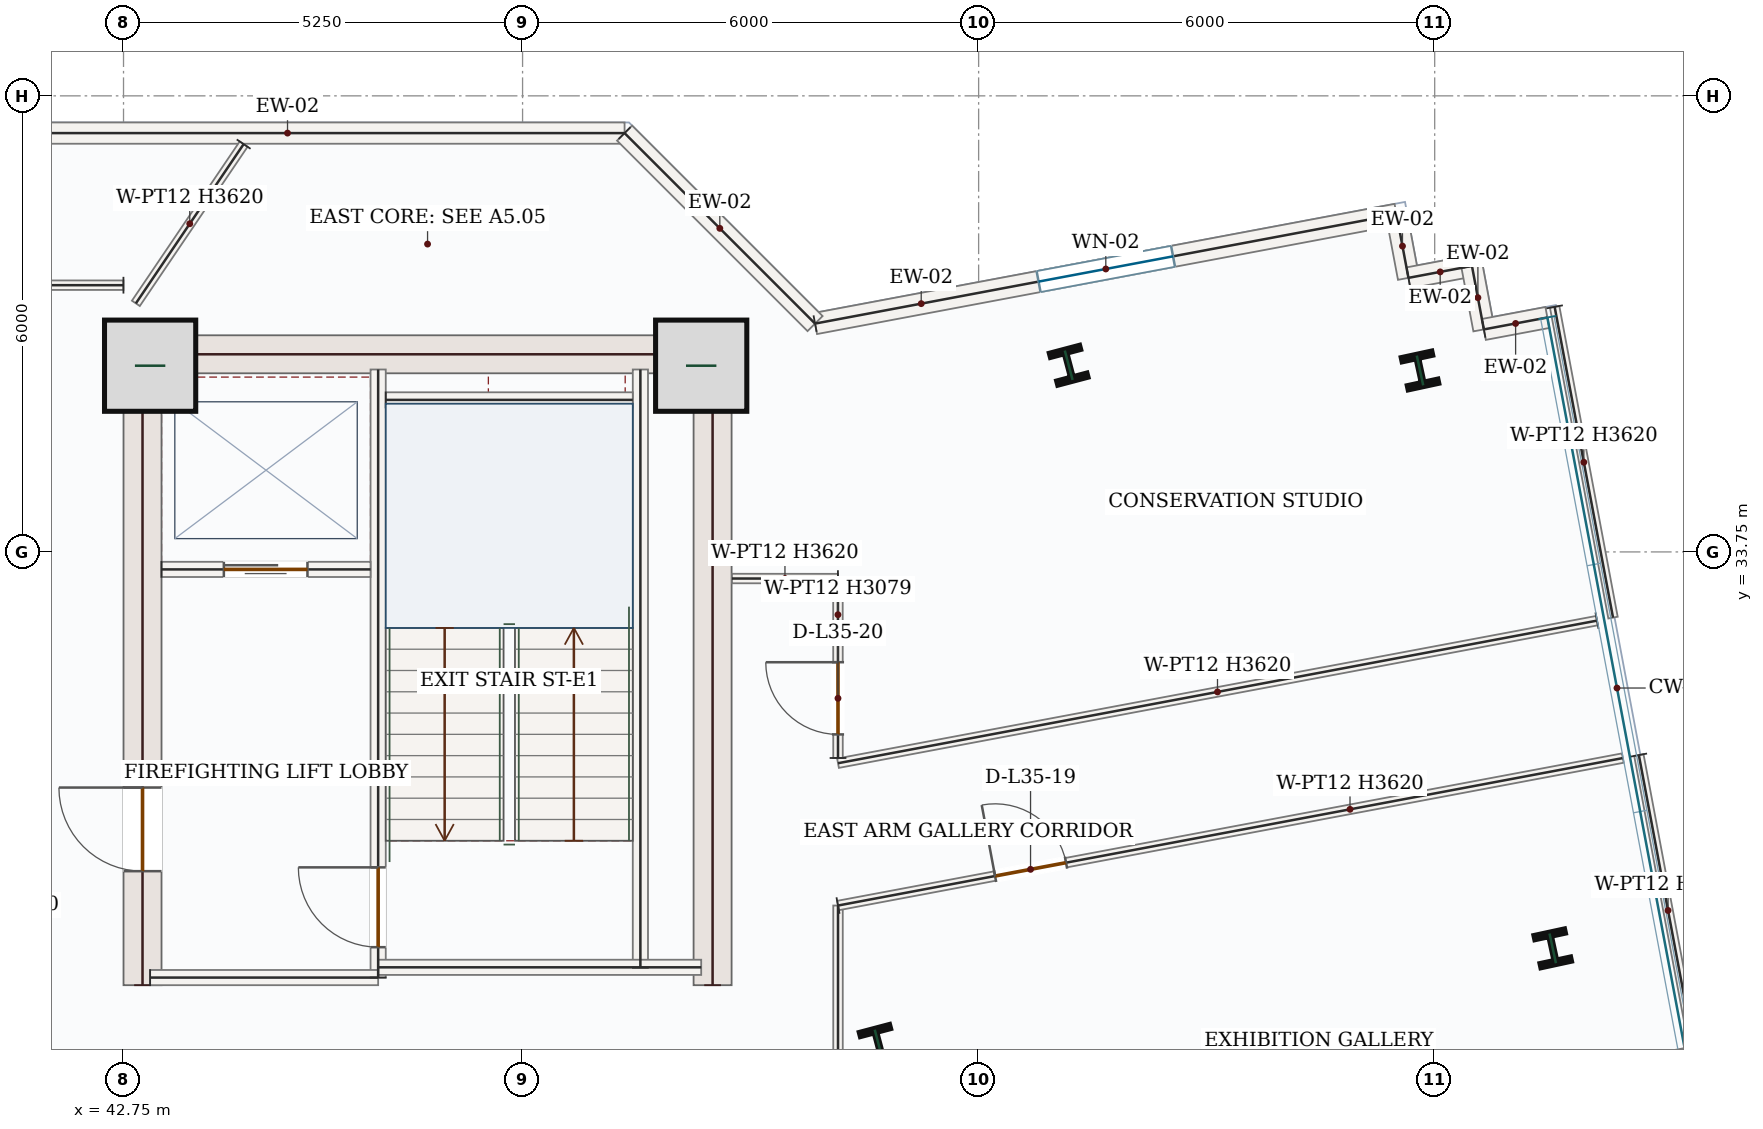
"""IFC4 building model, lengths in metres.
Left out: names, types, materials, properties, quantities, classifications, styles, units other than length and angle.
Written with IfcOpenShell. Run it as: python <this file> out.ifc"""

import sys

from ifc_helpers import new_model, si_unit, direction, frame, frame_2d, origin, origin_2d, place, context, subcontext, project, spatial, rectangle, i_section, extrude, source, transform, mapped, element, fill, save


model = new_model("IFC4")
c1 = context("Model", 3, precision=1e-05, world=origin(), true_north=direction((0.0, 1.0)))
c2 = subcontext(c1, "Body", "Model", "MODEL_VIEW")
j1 = project(units=[si_unit("LENGTHUNIT", "METRE"), si_unit("PLANEANGLEUNIT", "RADIAN")], contexts=[c1])
p1 = place(None, origin())
s1 = spatial("IfcSite", under=j1, at=p1, CompositionType="ELEMENT")
p2 = place(p1, origin())
s2 = spatial("IfcBuilding", under=s1, at=p2, CompositionType="ELEMENT")
p3 = place(p2, frame((0.0, 0.0, 155.1)))
s3 = spatial("IfcBuildingStorey", under=s2, at=p3, CompositionType="ELEMENT", Elevation=155.1)
p4 = place(p3, frame((43.0, 28.05, 0.0), z_axis=(0.0, 0.0, 1.0), x_axis=(0.0, 1.0, 0.0)))
e1 = element("IfcWall", 1, at=p4, inside=s3, PredefinedType="SHEAR", context=c2, shape_type="SweptSolid", body=[
    extrude(rectangle(XDim=8.55, YDim=0.5, at=frame_2d((4.275, 0.0))), origin(), (0.0, 0.0, 1.0), 3.62),
])
p5 = place(p4, frame((1.5, 0.0, 0.0)))
e2 = element("IfcOpeningElement", 2, at=p5, cuts=e1, PredefinedType="OPENING", context=c2, shape_type="SweptSolid", body=[
    extrude(rectangle(XDim=1.1, YDim=2.2, at=frame_2d((0.55, 1.1))), frame((0.0, 0.26, 0.0), z_axis=(0.0, -1.0, 0.0), x_axis=(1.0, 0.0, 0.0)), (0.0, 0.0, 1.0), 0.52),
])
m1 = source(origin(), c2, "Body", "SweptSolid", [
    extrude(rectangle(XDim=8.55, YDim=0.5, at=frame_2d((4.275, 0.0))), origin(), (0.0, 0.0, 1.0), 3.62),
])
p6 = place(p3, frame((50.5, 28.05, 0.0), z_axis=(0.0, 0.0, 1.0), x_axis=(0.0, 1.0, 0.0)))
e3 = element("IfcWall", 3, at=p6, inside=s3, PredefinedType="SHEAR", context=c2, shape_type="MappedRepresentation", body=[
    mapped(m1, transform((0.0, 0.0, 0.0), x_axis=(1.0, 0.0, 0.0), y_axis=(0.0, 1.0, 0.0), z_axis=(0.0, 0.0, 1.0), scale=1.0)),
])
m2 = source(origin(), c2, "Body", "SweptSolid", [
    extrude(rectangle(XDim=7.0, YDim=0.5, at=frame_2d((3.5, 0.0))), origin(), (0.0, 0.0, 1.0), 3.62),
])
p7 = place(p3, frame((43.25, 36.35, 0.0), z_axis=(0.0, 0.0, 1.0), x_axis=(1.0, 0.0, 0.0)))
e4 = element("IfcWall", 4, at=p7, inside=s3, PredefinedType="SHEAR", context=c2, shape_type="MappedRepresentation", body=[
    mapped(m2, transform((0.0, 0.0, 0.0), x_axis=(1.0, 0.0, 0.0), y_axis=(0.0, 1.0, 0.0), z_axis=(0.0, 0.0, 1.0), scale=1.0)),
])
m3 = source(origin(), c2, "Body", "SweptSolid", [
    extrude(rectangle(XDim=1.2, YDim=1.2, at=origin_2d()), origin(), (0.0, 0.0, 1.0), 3.9),
])
for number, where, z_axis, x_axis in (
    (5, (43.1, 36.2, 0.0), (0.0, 0.0, 1.0), (1.0, 0.0, 0.0)),
    (6, (50.35, 36.2, 0.0), (0.0, 0.0, 1.0), (1.0, 0.0, 0.0)),
):
    element("IfcColumn", number, at=place(p3, frame(where, z_axis=z_axis, x_axis=x_axis)), inside=s3, PredefinedType="COLUMN", context=c2, shape_type="MappedRepresentation", body=[
        mapped(m3, transform((0.0, 0.0, 0.0), x_axis=(1.0, 0.0, 0.0), y_axis=(0.0, 1.0, 0.0), z_axis=(0.0, 0.0, 1.0), scale=1.0)),
    ])
m4 = source(origin(), c2, "Body", "SweptSolid", [
    extrude(i_section(OverallWidth=0.412, OverallDepth=0.435, WebThickness=0.036, FlangeThickness=0.057, FilletRadius=0.018, at=origin_2d()), origin(), (0.0, 0.0, 1.0), 3.9),
])
for number, where, z_axis, x_axis in (
    (7, (52.684, 27.271, 0.0), (0.0, 0.0, 1.0), (0.967, 0.255, 0.0)),
    (8, (55.185, 36.206, 0.0), (0.0, 0.0, 1.0), (0.967, 0.255, 0.0)),
    (9, (61.553, 28.535, 0.0), (0.0, 0.0, 1.0), (0.977, 0.211, 0.0)),
    (10, (59.807, 36.137, 0.0), (0.0, 0.0, 1.0), (0.977, 0.211, 0.0)),
):
    element("IfcColumn", number, at=place(p3, frame(where, z_axis=z_axis, x_axis=x_axis)), inside=s3, PredefinedType="COLUMN", context=c2, shape_type="MappedRepresentation", body=[
        mapped(m4, transform((0.0, 0.0, 0.0), x_axis=(1.0, 0.0, 0.0), y_axis=(0.0, 1.0, 0.0), z_axis=(0.0, 0.0, 1.0), scale=1.0)),
    ])
p8 = place(p3, frame((51.848, 36.754, 0.0), z_axis=(0.0, 0.0, 1.0), x_axis=(0.982809278234, 0.18462373254, 0.0)))
e11 = element("IfcWall", 11, at=p8, inside=s3, PredefinedType="SOLIDWALL", context=c2, shape_type="SweptSolid", body=[
    extrude(rectangle(XDim=7.783, YDim=0.28, at=frame_2d((3.892, 0.0))), origin(), (0.0, 0.0, 1.0), 3.62),
])
p9 = place(p8, frame((2.992, 0.0, 0.85)))
e12 = element("IfcOpeningElement", 12, at=p9, cuts=e11, PredefinedType="OPENING", context=c2, shape_type="SweptSolid", body=[
    extrude(rectangle(XDim=1.8, YDim=1.75, at=frame_2d((0.9, 0.875))), frame((0.0, 0.15, 0.0), z_axis=(0.0, -1.0, 0.0), x_axis=(1.0, 0.0, 0.0)), (0.0, 0.0, 1.0), 0.3),
])
m5 = source(origin(), c2, "Body", "SweptSolid", [
    extrude(rectangle(XDim=0.85, YDim=0.28, at=frame_2d((0.425, 0.0))), origin(), (0.0, 0.0, 1.0), 3.62),
])
p10 = place(p3, frame((59.498, 38.191, 0.0), z_axis=(0.0, 0.0, 1.0), x_axis=(0.184670010318, -0.982800583684, 0.0)))
e13 = element("IfcWall", 13, at=p10, inside=s3, PredefinedType="SOLIDWALL", context=c2, shape_type="MappedRepresentation", body=[
    mapped(m5, transform((0.0, 0.0, 0.0), x_axis=(1.0, 0.0, 0.0), y_axis=(0.0, 1.0, 0.0), z_axis=(0.0, 0.0, 1.0), scale=1.0)),
])
m6 = source(origin(), c2, "Body", "SweptSolid", [
    extrude(rectangle(XDim=0.85, YDim=0.28, at=frame_2d((0.425, 0.0))), origin(), (0.0, 0.0, 1.0), 3.62),
])
for number, where, z_axis, x_axis in (
    (14, (59.655, 37.355, 0.0), (0.0, 0.0, 1.0), (0.983, 0.185, 0.0)),
    (15, (60.49, 37.512, 0.0), (0.0, 0.0, 1.0), (0.185, -0.983, 0.0)),
):
    element("IfcWall", number, at=place(p3, frame(where, z_axis=z_axis, x_axis=x_axis)), inside=s3, PredefinedType="SOLIDWALL", context=c2, shape_type="MappedRepresentation", body=[
        mapped(m6, transform((0.0, 0.0, 0.0), x_axis=(1.0, 0.0, 0.0), y_axis=(0.0, 1.0, 0.0), z_axis=(0.0, 0.0, 1.0), scale=1.0)),
    ])
for number, where, z_axis, x_axis in (
    (16, (60.647, 36.677, 0.0), (0.0, 0.0, 1.0), (0.983, 0.184, 0.0)),
    (17, (63.314, 27.085, 0.0), (0.0, 0.0, 1.0), (-0.983, -0.185, 0.0)),
):
    element("IfcWall", number, at=place(p3, frame(where, z_axis=z_axis, x_axis=x_axis)), inside=s3, PredefinedType="SOLIDWALL", context=c2, shape_type="MappedRepresentation", body=[
        mapped(m5, transform((0.0, 0.0, 0.0), x_axis=(1.0, 0.0, 0.0), y_axis=(0.0, 1.0, 0.0), z_axis=(0.0, 0.0, 1.0), scale=1.0)),
    ])
m7 = source(origin(), c2, "Body", "SweptSolid", [
    extrude(rectangle(XDim=8.869, YDim=0.28, at=frame_2d((4.434, 0.0))), origin(), (0.0, 0.0, 1.0), 3.62),
])
p11 = place(p3, frame((40.473, 39.26, 0.0), z_axis=(0.0, 0.0, 1.0), x_axis=(1.0, 0.0, 0.0)))
e18 = element("IfcWall", 18, at=p11, inside=s3, PredefinedType="SOLIDWALL", context=c2, shape_type="MappedRepresentation", body=[
    mapped(m7, transform((0.0, 0.0, 0.0), x_axis=(1.0, 0.0, 0.0), y_axis=(0.0, 1.0, 0.0), z_axis=(0.0, 0.0, 1.0), scale=1.0)),
])
m8 = source(origin(), c2, "Body", "SweptSolid", [
    extrude(rectangle(XDim=3.544, YDim=0.28, at=frame_2d((1.772, 0.0))), origin(), (0.0, 0.0, 1.0), 3.62),
])
p12 = place(p3, frame((49.342, 39.26, 0.0), z_axis=(0.0, 0.0, 1.0), x_axis=(0.707106781187, -0.707106781187, 0.0)))
e19 = element("IfcWall", 19, at=p12, inside=s3, PredefinedType="SOLIDWALL", context=c2, shape_type="MappedRepresentation", body=[
    mapped(m8, transform((0.0, 0.0, 0.0), x_axis=(1.0, 0.0, 0.0), y_axis=(0.0, 1.0, 0.0), z_axis=(0.0, 0.0, 1.0), scale=1.0)),
])
m9 = source(origin(), c2, "Body", "SweptSolid", [
    extrude(rectangle(XDim=7.87, YDim=0.2, at=frame_2d((3.935, 0.0))), origin(), (0.0, 0.0, 1.0), 3.62),
])
p13 = place(p3, frame((49.55, 28.28, 0.0), z_axis=(0.0, 0.0, 1.0), x_axis=(0.0, 1.0, 0.0)))
e20 = element("IfcWall", 20, at=p13, inside=s3, PredefinedType="SOLIDWALL", context=c2, shape_type="MappedRepresentation", body=[
    mapped(m9, transform((0.0, 0.0, 0.0), x_axis=(1.0, 0.0, 0.0), y_axis=(0.0, 1.0, 0.0), z_axis=(0.0, 0.0, 1.0), scale=1.0)),
])
p14 = place(p3, frame((46.1, 28.15, 0.0), z_axis=(0.0, 0.0, 1.0), x_axis=(0.0, 1.0, 0.0)))
e21 = element("IfcWall", 21, at=p14, inside=s3, PredefinedType="SOLIDWALL", context=c2, shape_type="SweptSolid", body=[
    extrude(rectangle(XDim=8.0, YDim=0.2, at=frame_2d((4.0, 0.0))), origin(), (0.0, 0.0, 1.0), 3.62),
])
p15 = place(p14, frame((0.4, 0.0, 0.0)))
e22 = element("IfcOpeningElement", 22, at=p15, cuts=e21, PredefinedType="OPENING", context=c2, shape_type="SweptSolid", body=[
    extrude(rectangle(XDim=1.05, YDim=2.15, at=frame_2d((0.525, 1.075))), frame((0.0, 0.11, 0.0), z_axis=(0.0, -1.0, 0.0), x_axis=(1.0, 0.0, 0.0)), (0.0, 0.0, 1.0), 0.22),
])
m10 = source(origin(), c2, "Body", "SweptSolid", [
    extrude(rectangle(XDim=3.0, YDim=0.2, at=frame_2d((1.5, 0.0))), origin(), (0.0, 0.0, 1.0), 3.62),
])
p16 = place(p3, frame((43.1, 28.15, 0.0), z_axis=(0.0, 0.0, 1.0), x_axis=(1.0, 0.0, 0.0)))
e23 = element("IfcWall", 23, at=p16, inside=s3, PredefinedType="SOLIDWALL", context=c2, shape_type="MappedRepresentation", body=[
    mapped(m10, transform((0.0, 0.0, 0.0), x_axis=(1.0, 0.0, 0.0), y_axis=(0.0, 1.0, 0.0), z_axis=(0.0, 0.0, 1.0), scale=1.0)),
])
m11 = source(origin(), c2, "Body", "SweptSolid", [
    extrude(rectangle(XDim=4.25, YDim=0.2, at=frame_2d((2.125, 0.0))), origin(), (0.0, 0.0, 1.0), 3.62),
])
p17 = place(p3, frame((46.1, 28.285, 0.0), z_axis=(0.0, 0.0, 1.0), x_axis=(1.0, 0.0, 0.0)))
e24 = element("IfcWall", 24, at=p17, inside=s3, PredefinedType="SOLIDWALL", context=c2, shape_type="MappedRepresentation", body=[
    mapped(m11, transform((0.0, 0.0, 0.0), x_axis=(1.0, 0.0, 0.0), y_axis=(0.0, 1.0, 0.0), z_axis=(0.0, 0.0, 1.0), scale=1.0)),
])
m12 = source(origin(), c2, "Body", "SweptSolid", [
    extrude(rectangle(XDim=3.25, YDim=0.2, at=frame_2d((1.625, 0.0))), origin(), (0.0, 0.0, 1.0), 3.62),
])
p18 = place(p3, frame((46.2, 35.75, 0.0), z_axis=(0.0, 0.0, 1.0), x_axis=(1.0, 0.0, 0.0)))
e25 = element("IfcWall", 25, at=p18, inside=s3, PredefinedType="SOLIDWALL", context=c2, shape_type="MappedRepresentation", body=[
    mapped(m12, transform((0.0, 0.0, 0.0), x_axis=(1.0, 0.0, 0.0), y_axis=(0.0, 1.0, 0.0), z_axis=(0.0, 0.0, 1.0), scale=1.0)),
])
p19 = place(p3, frame((43.25, 33.52, 0.0), z_axis=(0.0, 0.0, 1.0), x_axis=(1.0, 0.0, 0.0)))
e26 = element("IfcWall", 26, at=p19, inside=s3, PredefinedType="SOLIDWALL", context=c2, shape_type="SweptSolid", body=[
    extrude(rectangle(XDim=2.75, YDim=0.2, at=frame_2d((1.375, 0.0))), origin(), (0.0, 0.0, 1.0), 3.62),
])
p20 = place(p19, frame((0.82, 0.0, 0.0)))
e27 = element("IfcOpeningElement", 27, at=p20, cuts=e26, PredefinedType="OPENING", context=c2, shape_type="SweptSolid", body=[
    extrude(rectangle(XDim=1.1, YDim=2.15, at=frame_2d((0.55, 1.075))), frame((0.0, 0.11, 0.0), z_axis=(0.0, -1.0, 0.0), x_axis=(1.0, 0.0, 0.0)), (0.0, 0.0, 1.0), 0.22),
])
p21 = place(p3, frame((42.749, 37.259, 0.0), z_axis=(0.0, 0.0, 1.0), x_axis=(-0.999999992041, 0.000126163065, 0.0)))
e28 = element("IfcWall", 28, at=p21, inside=s3, PredefinedType="PARTITIONING", context=c2, shape_type="SweptSolid", body=[
    extrude(rectangle(XDim=7.74, YDim=0.125, at=frame_2d((3.87, 0.0))), origin(), (0.0, 0.0, 1.0), 3.62),
])
p22 = place(p21, frame((5.296, 0.0, 0.0)))
e29 = element("IfcOpeningElement", 29, at=p22, cuts=e28, PredefinedType="OPENING", context=c2, shape_type="SweptSolid", body=[
    extrude(rectangle(XDim=0.95, YDim=2.15, at=frame_2d((0.475, 1.075))), frame((0.0, 0.073, 0.0), z_axis=(0.0, -1.0, 0.0), x_axis=(1.0, 0.0, 0.0)), (0.0, 0.0, 1.0), 0.145),
])
m13 = source(origin(), c2, "Body", "SweptSolid", [
    extrude(rectangle(XDim=2.53, YDim=0.125, at=frame_2d((1.265, 0.0))), origin(), (0.0, 0.0, 1.0), 3.62),
])
p23 = place(p3, frame((44.33, 39.115, 0.0), z_axis=(0.0, 0.0, 1.0), x_axis=(-0.560455418396, -0.82818459536, 0.0)))
e30 = element("IfcWall", 30, at=p23, inside=s3, PredefinedType="PARTITIONING", context=c2, shape_type="MappedRepresentation", body=[
    mapped(m13, transform((0.0, 0.0, 0.0), x_axis=(1.0, 0.0, 0.0), y_axis=(0.0, 1.0, 0.0), z_axis=(0.0, 0.0, 1.0), scale=1.0)),
])
m14 = source(origin(), c2, "Body", "SweptSolid", [
    extrude(rectangle(XDim=4.16, YDim=0.125, at=frame_2d((2.08, 0.0))), origin(), (0.0, 0.0, 1.0), 3.62),
])
p24 = place(p3, frame((62.686, 31.077, 0.0), z_axis=(0.0, 0.0, 1.0), x_axis=(0.184635785614, -0.982807013951, 0.0)))
e31 = element("IfcWall", 31, at=p24, inside=s3, PredefinedType="PARTITIONING", context=c2, shape_type="MappedRepresentation", body=[
    mapped(m14, transform((0.0, 0.0, 0.0), x_axis=(1.0, 0.0, 0.0), y_axis=(0.0, 1.0, 0.0), z_axis=(0.0, 0.0, 1.0), scale=1.0)),
])
m15 = source(origin(), c2, "Body", "SweptSolid", [
    extrude(rectangle(XDim=5.975, YDim=0.125, at=frame_2d((2.988, 0.0))), origin(), (0.0, 0.0, 1.0), 2.693),
])
p25 = place(p3, frame((52.15, 23.123, 0.0), z_axis=(0.0, 0.0, 1.0), x_axis=(0.0, 1.0, 0.0)))
e32 = element("IfcWall", 32, at=p25, inside=s3, PredefinedType="PARTITIONING", context=c2, shape_type="MappedRepresentation", body=[
    mapped(m15, transform((0.0, 0.0, 0.0), x_axis=(1.0, 0.0, 0.0), y_axis=(0.0, 1.0, 0.0), z_axis=(0.0, 0.0, 1.0), scale=1.0)),
])
p26 = place(p3, frame((52.15, 29.098, 0.0), z_axis=(0.0, 0.0, 1.0), x_axis=(0.982805559331, 0.184643528314, 0.0)))
e33 = element("IfcWall", 33, at=p26, inside=s3, PredefinedType="PARTITIONING", context=c2, shape_type="SweptSolid", body=[
    extrude(rectangle(XDim=10.505, YDim=0.125, at=frame_2d((5.252, 0.0))), origin(), (0.0, 0.0, 1.0), 3.62),
])
p27 = place(p26, frame((2.102, 0.0, 0.0)))
e34 = element("IfcOpeningElement", 34, at=p27, cuts=e33, PredefinedType="OPENING", context=c2, shape_type="SweptSolid", body=[
    extrude(rectangle(XDim=0.95, YDim=2.15, at=frame_2d((0.475, 1.075))), frame((0.0, 0.073, 0.0), z_axis=(0.0, -1.0, 0.0), x_axis=(1.0, 0.0, 0.0)), (0.0, 0.0, 1.0), 0.145),
])
p28 = place(p3, frame((61.578, 36.974, 0.0), z_axis=(0.0, 0.0, 1.0), x_axis=(0.184635785614, -0.982807013951, 0.0)))
e35 = element("IfcWall", 35, at=p28, inside=s3, PredefinedType="PARTITIONING", context=c2, shape_type="MappedRepresentation", body=[
    mapped(m14, transform((0.0, 0.0, 0.0), x_axis=(1.0, 0.0, 0.0), y_axis=(0.0, 1.0, 0.0), z_axis=(0.0, 0.0, 1.0), scale=1.0)),
])
m16 = source(origin(), c2, "Body", "SweptSolid", [
    extrude(rectangle(XDim=10.16, YDim=0.125, at=frame_2d((5.08, 0.0))), origin(), (0.0, 0.0, 1.0), 3.62),
])
p29 = place(p3, frame((62.135, 32.846, 0.0), z_axis=(0.0, 0.0, 1.0), x_axis=(-0.982809288671, -0.184623676981, 0.0)))
e36 = element("IfcWall", 36, at=p29, inside=s3, PredefinedType="PARTITIONING", context=c2, shape_type="MappedRepresentation", body=[
    mapped(m16, transform((0.0, 0.0, 0.0), x_axis=(1.0, 0.0, 0.0), y_axis=(0.0, 1.0, 0.0), z_axis=(0.0, 0.0, 1.0), scale=1.0)),
])
p30 = place(p3, frame((52.15, 31.039, 0.0), z_axis=(0.0, 0.0, 1.0), x_axis=(-0.0004137788, 0.999999914394, 0.0)))
e37 = element("IfcWall", 37, at=p30, inside=s3, PredefinedType="PARTITIONING", context=c2, shape_type="SweptSolid", body=[
    extrude(rectangle(XDim=2.36, YDim=0.125, at=frame_2d((1.18, 0.0))), origin(), (0.0, 0.0, 1.0), 3.079),
])
p31 = place(p30, frame((0.31, 0.0, 0.0)))
e38 = element("IfcOpeningElement", 38, at=p31, cuts=e37, PredefinedType="OPENING", context=c2, shape_type="SweptSolid", body=[
    extrude(rectangle(XDim=0.95, YDim=2.15, at=frame_2d((0.475, 1.075))), frame((0.0, 0.073, 0.0), z_axis=(0.0, -1.0, 0.0), x_axis=(1.0, 0.0, 0.0)), (0.0, 0.0, 1.0), 0.145),
])
m17 = source(origin(), c2, "Body", "SweptSolid", [
    extrude(rectangle(XDim=1.394, YDim=0.125, at=frame_2d((0.697, 0.0))), origin(), (0.0, 0.0, 1.0), 3.62),
])
p32 = place(p3, frame((52.149, 33.399, 0.0), z_axis=(0.0, 0.0, 1.0), x_axis=(-0.999999754632, 0.000700525222, 0.0)))
e39 = element("IfcWall", 39, at=p32, inside=s3, PredefinedType="PARTITIONING", context=c2, shape_type="MappedRepresentation", body=[
    mapped(m17, transform((0.0, 0.0, 0.0), x_axis=(1.0, 0.0, 0.0), y_axis=(0.0, 1.0, 0.0), z_axis=(0.0, 0.0, 1.0), scale=1.0)),
])
m18 = source(origin(), c2, "Body", "SweptSolid", [
    extrude(rectangle(XDim=1.8, YDim=1.75, at=frame_2d((0.9, 0.875))), frame((0.0, 0.03, 0.0), z_axis=(0.0, -1.0, 0.0), x_axis=(1.0, 0.0, 0.0)), (0.0, 0.0, 1.0), 0.06),
])
p33 = place(p9, origin())
e40 = element("IfcWindow", 40, at=p33, inside=s3, PartitioningType="DOUBLE_PANEL_VERTICAL", PredefinedType="WINDOW", context=c2, shape_type="MappedRepresentation", body=[
    mapped(m18, transform((0.0, 0.0, 0.0), x_axis=(1.0, 0.0, 0.0), y_axis=(0.0, 1.0, 0.0), z_axis=(0.0, 0.0, 1.0), scale=1.0)),
])
fill(e12, e40)
m19 = source(origin(), c2, "Body", "SweptSolid", [
    extrude(rectangle(XDim=1.05, YDim=2.15, at=frame_2d((0.525, 1.075))), frame((0.0, 0.025, 0.0), z_axis=(0.0, -1.0, 0.0), x_axis=(1.0, 0.0, 0.0)), (0.0, 0.0, 1.0), 0.05),
])
p34 = place(p15, origin())
e41 = element("IfcDoor", 41, at=p34, inside=s3, OperationType="SINGLE_SWING_RIGHT", PredefinedType="DOOR", context=c2, shape_type="MappedRepresentation", body=[
    mapped(m19, transform((0.0, 0.0, 0.0), x_axis=(1.0, 0.0, 0.0), y_axis=(0.0, 1.0, 0.0), z_axis=(0.0, 0.0, 1.0), scale=1.0)),
])
fill(e22, e41)
m20 = source(origin(), c2, "Body", "SweptSolid", [
    extrude(rectangle(XDim=1.1, YDim=2.15, at=frame_2d((0.55, 1.075))), frame((0.0, 0.025, 0.0), z_axis=(0.0, -1.0, 0.0), x_axis=(1.0, 0.0, 0.0)), (0.0, 0.0, 1.0), 0.05),
])
p35 = place(p20, origin())
e42 = element("IfcDoor", 42, at=p35, inside=s3, OperationType="DOUBLE_DOOR_SLIDING", PredefinedType="DOOR", context=c2, shape_type="MappedRepresentation", body=[
    mapped(m20, transform((0.0, 0.0, 0.0), x_axis=(1.0, 0.0, 0.0), y_axis=(0.0, 1.0, 0.0), z_axis=(0.0, 0.0, 1.0), scale=1.0)),
])
fill(e27, e42)
m21 = source(origin(), c2, "Body", "SweptSolid", [
    extrude(rectangle(XDim=1.1, YDim=2.2, at=frame_2d((0.55, 1.1))), frame((0.0, 0.025, 0.0), z_axis=(0.0, -1.0, 0.0), x_axis=(1.0, 0.0, 0.0)), (0.0, 0.0, 1.0), 0.05),
])
p36 = place(p5, origin())
e43 = element("IfcDoor", 43, at=p36, inside=s3, OperationType="SINGLE_SWING_RIGHT", PredefinedType="DOOR", context=c2, shape_type="MappedRepresentation", body=[
    mapped(m21, transform((0.0, 0.0, 0.0), x_axis=(1.0, 0.0, 0.0), y_axis=(0.0, 1.0, 0.0), z_axis=(0.0, 0.0, 1.0), scale=1.0)),
])
fill(e2, e43)
m22 = source(origin(), c2, "Body", "SweptSolid", [
    extrude(rectangle(XDim=0.95, YDim=2.15, at=frame_2d((0.475, 1.075))), frame((0.0, 0.025, 0.0), z_axis=(0.0, -1.0, 0.0), x_axis=(1.0, 0.0, 0.0)), (0.0, 0.0, 1.0), 0.05),
])
p37 = place(p27, origin())
e44 = element("IfcDoor", 44, at=p37, inside=s3, OperationType="SINGLE_SWING_LEFT", PredefinedType="DOOR", context=c2, shape_type="MappedRepresentation", body=[
    mapped(m22, transform((0.0, 0.0, 0.0), x_axis=(1.0, 0.0, 0.0), y_axis=(0.0, 1.0, 0.0), z_axis=(0.0, 0.0, 1.0), scale=1.0)),
])
fill(e34, e44)
p38 = place(p31, origin())
e45 = element("IfcDoor", 45, at=p38, inside=s3, OperationType="SINGLE_SWING_RIGHT", PredefinedType="DOOR", context=c2, shape_type="MappedRepresentation", body=[
    mapped(m22, transform((0.0, 0.0, 0.0), x_axis=(1.0, 0.0, 0.0), y_axis=(0.0, 1.0, 0.0), z_axis=(0.0, 0.0, 1.0), scale=1.0)),
])
fill(e38, e45)
save(model, sys.argv[1])
